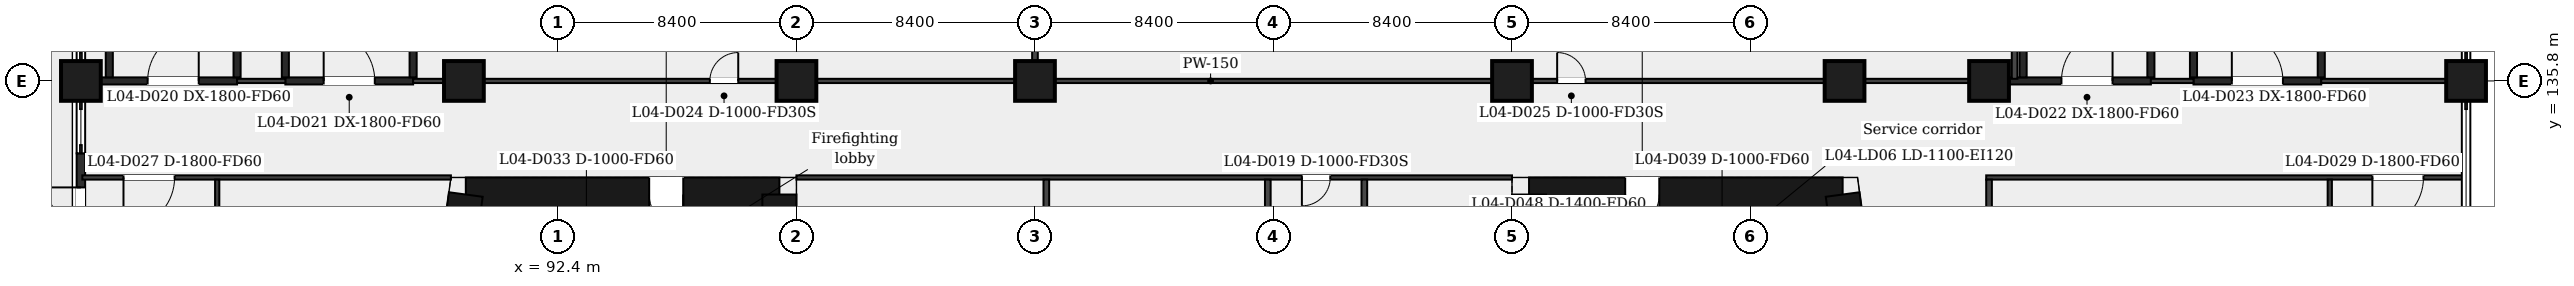
"""IFC4 building model, lengths in metres.
Left out: names, types, materials, properties, quantities, classifications, styles, units other than length and angle.
Written with IfcOpenShell. Run it as: python <this file> out.ifc"""

import sys

from ifc_helpers import new_model, si_unit, direction, frame, frame_2d, origin, origin_2d, place, context, subcontext, project, spatial, rectangle, extrude, element, fill, save


model = new_model("IFC4")
c1 = context("Model", 3, precision=1e-05, world=origin(), true_north=direction((0.0, 1.0)))
c2 = subcontext(c1, "Body", "Model", "MODEL_VIEW")
j1 = project(units=[si_unit("LENGTHUNIT", "METRE"), si_unit("PLANEANGLEUNIT", "RADIAN")], contexts=[c1])
p1 = place(None, origin())
s1 = spatial("IfcSite", under=j1, at=p1, CompositionType="ELEMENT")
p2 = place(p1, origin())
s2 = spatial("IfcBuilding", under=s1, at=p2, CompositionType="ELEMENT")
p3 = place(p2, frame((0.0, 0.0, 29.0)))
s3 = spatial("IfcBuildingStorey", under=s2, at=p3, CompositionType="ELEMENT", Elevation=29.0)
p4 = place(p3, frame((89.156, 131.8, 0.0), z_axis=(0.0, 0.0, 1.0), x_axis=(1.0, 0.0, 0.0)))
e1 = element("IfcWall", 1, at=p4, inside=s3, PredefinedType="SHEAR", context=c2, shape_type="SweptSolid", body=[
    extrude(rectangle(XDim=11.044, YDim=1.2, at=frame_2d((5.522, 0.0))), origin(), (0.0, 0.0, 1.0), 5.0),
])
p5 = place(p4, frame((6.458, 0.0, 0.0)))
e2 = element("IfcOpeningElement", 2, at=p5, cuts=e1, PredefinedType="OPENING", context=c2, shape_type="SweptSolid", body=[
    extrude(rectangle(XDim=1.2, YDim=2.1, at=frame_2d((0.6, 1.05))), frame((0.0, 0.61, 0.0), z_axis=(0.0, -1.0, 0.0), x_axis=(1.0, 0.0, 0.0)), (0.0, 0.0, 1.0), 1.22),
])
p6 = place(p3, frame((100.2, 131.8, 0.0), z_axis=(0.0, 0.0, 1.0), x_axis=(0.0, -1.0, 0.0)))
e3 = element("IfcWall", 3, at=p6, inside=s3, PredefinedType="SHEAR", context=c2, shape_type="SweptSolid", body=[
    extrude(rectangle(XDim=20.8, YDim=1.2, at=frame_2d((10.4, 0.0))), origin(), (0.0, 0.0, 1.0), 5.0),
])
p7 = place(p6, frame((7.65, 0.0, 0.0)))
e4 = element("IfcOpeningElement", 4, at=p7, cuts=e3, PredefinedType="OPENING", context=c2, shape_type="SweptSolid", body=[
    extrude(rectangle(XDim=1.4, YDim=2.1, at=frame_2d((0.7, 1.05))), frame((0.0, 0.61, 0.0), z_axis=(0.0, -1.0, 0.0), x_axis=(1.0, 0.0, 0.0)), (0.0, 0.0, 1.0), 1.22),
])
p8 = place(p3, frame((86.355, 111.0, 0.0), z_axis=(0.0, 0.0, 1.0), x_axis=(0.133413989637, 0.99106039542, 0.0)))
e5 = element("IfcWall", 5, at=p8, inside=s3, PredefinedType="SHEAR", context=c2, shape_type="SweptSolid", body=[
    extrude(rectangle(XDim=20.988, YDim=1.2, at=frame_2d((10.494, 0.0))), origin(), (0.0, 0.0, 1.0), 5.0),
])
p9 = place(p3, frame((126.6, 131.8, 0.0), z_axis=(0.0, 0.0, 1.0), x_axis=(1.0, 0.0, 0.0)))
e6 = element("IfcWall", 6, at=p9, inside=s3, PredefinedType="SHEAR", context=c2, shape_type="SweptSolid", body=[
    extrude(rectangle(XDim=11.044, YDim=1.2, at=frame_2d((5.522, 0.0))), origin(), (0.0, 0.0, 1.0), 5.0),
])
p10 = place(p9, frame((3.386, 0.0, 0.0)))
e7 = element("IfcOpeningElement", 7, at=p10, cuts=e6, PredefinedType="OPENING", context=c2, shape_type="SweptSolid", body=[
    extrude(rectangle(XDim=1.2, YDim=2.1, at=frame_2d((0.6, 1.05))), frame((0.0, 0.61, 0.0), z_axis=(0.0, -1.0, 0.0), x_axis=(1.0, 0.0, 0.0)), (0.0, 0.0, 1.0), 1.22),
])
p11 = place(p3, frame((137.645, 131.8, 0.0), z_axis=(0.0, 0.0, 1.0), x_axis=(0.133413989637, -0.99106039542, 0.0)))
e8 = element("IfcWall", 8, at=p11, inside=s3, PredefinedType="SHEAR", context=c2, shape_type="SweptSolid", body=[
    extrude(rectangle(XDim=20.988, YDim=1.2, at=frame_2d((10.494, 0.0))), origin(), (0.0, 0.0, 1.0), 5.0),
])
p12 = place(p3, frame((126.6, 111.0, 0.0), z_axis=(0.0, 0.0, 1.0), x_axis=(0.0, 1.0, 0.0)))
e9 = element("IfcWall", 9, at=p12, inside=s3, PredefinedType="SHEAR", context=c2, shape_type="SweptSolid", body=[
    extrude(rectangle(XDim=20.8, YDim=1.2, at=frame_2d((10.4, 0.0))), origin(), (0.0, 0.0, 1.0), 5.0),
])
p13 = place(p12, frame((11.75, 0.0, 0.0)))
e10 = element("IfcOpeningElement", 10, at=p13, cuts=e9, PredefinedType="OPENING", context=c2, shape_type="SweptSolid", body=[
    extrude(rectangle(XDim=1.4, YDim=2.1, at=frame_2d((0.7, 1.05))), frame((0.0, 0.61, 0.0), z_axis=(0.0, -1.0, 0.0), x_axis=(1.0, 0.0, 0.0)), (0.0, 0.0, 1.0), 1.22),
])
for number, where, z_axis, x_axis in (
    (11, (75.6, 135.8, 0.0), (0.0, 0.0, 1.0), (1.0, 0.0, 0.0)),
    (12, (89.088, 135.8, 0.0), (0.0, 0.0, 1.0), (1.0, 0.0, 0.0)),
    (13, (100.8, 135.8, 0.0), (0.0, 0.0, 1.0), (1.0, 0.0, 0.0)),
    (14, (109.2, 135.8, 0.0), (0.0, 0.0, 1.0), (1.0, 0.0, 0.0)),
    (15, (126.0, 135.8, 0.0), (0.0, 0.0, 1.0), (1.0, 0.0, 0.0)),
    (16, (137.711, 135.8, 0.0), (0.0, 0.0, 1.0), (1.0, 0.0, 0.0)),
    (17, (142.8, 135.8, 0.0), (0.0, 0.0, 1.0), (1.0, 0.0, 0.0)),
    (18, (159.6, 135.8, 0.0), (0.0, 0.0, 1.0), (1.0, 0.0, 0.0)),
):
    element("IfcColumn", number, at=place(p3, frame(where, z_axis=z_axis, x_axis=x_axis)), inside=s3, PredefinedType="COLUMN", context=c2, shape_type="SweptSolid", body=[
        extrude(rectangle(XDim=1.4, YDim=1.4, at=origin_2d()), origin(), (0.0, 0.0, 1.0), 5.0),
    ])
p14 = place(p3, frame((75.6, 128.45, 0.0), z_axis=(0.0, 0.0, 1.0), x_axis=(0.0, 1.0, 0.0)))
e19 = element("IfcWall", 19, at=p14, inside=s3, PredefinedType="SOLIDWALL", context=c2, shape_type="SweptSolid", body=[
    extrude(rectangle(XDim=4.8, YDim=0.3, at=frame_2d((2.4, 0.0))), origin(), (0.0, 0.0, 1.0), 4.4),
])
p15 = place(p14, frame((1.2, 0.0, 0.0)))
e20 = element("IfcOpeningElement", 20, at=p15, cuts=e19, PredefinedType="OPENING", context=c2, shape_type="SweptSolid", body=[
    extrude(rectangle(XDim=2.4, YDim=2.4, at=frame_2d((1.2, 1.2))), frame((0.0, 0.16, 0.0), z_axis=(0.0, -1.0, 0.0), x_axis=(1.0, 0.0, 0.0)), (0.0, 0.0, 1.0), 0.32),
])
p16 = place(p3, frame((75.65, 132.4, 0.0), z_axis=(0.0, 0.0, 1.0), x_axis=(1.0, 0.0, 0.0)))
e21 = element("IfcWall", 21, at=p16, inside=s3, PredefinedType="PARTITIONING", context=c2, shape_type="SweptSolid", body=[
    extrude(rectangle(XDim=12.981, YDim=0.15, at=frame_2d((6.491, 0.0))), origin(), (0.0, 0.0, 1.0), 4.4),
])
p17 = place(p16, frame((1.45, 0.0, 0.0)))
e22 = element("IfcOpeningElement", 22, at=p17, cuts=e21, PredefinedType="OPENING", context=c2, shape_type="SweptSolid", body=[
    extrude(rectangle(XDim=1.8, YDim=2.1, at=frame_2d((0.9, 1.05))), frame((0.0, 0.085, 0.0), z_axis=(0.0, -1.0, 0.0), x_axis=(1.0, 0.0, 0.0)), (0.0, 0.0, 1.0), 0.17),
])
p18 = place(p3, frame((100.8, 132.4, 0.0), z_axis=(0.0, 0.0, 1.0), x_axis=(1.0, 0.0, 0.0)))
e23 = element("IfcWall", 23, at=p18, inside=s3, PredefinedType="PARTITIONING", context=c2, shape_type="SweptSolid", body=[
    extrude(rectangle(XDim=25.2, YDim=0.15, at=frame_2d((12.6, 0.0))), origin(), (0.0, 0.0, 1.0), 4.4),
])
p19 = place(p18, frame((17.8, 0.0, 0.0)))
e24 = element("IfcOpeningElement", 24, at=p19, cuts=e23, PredefinedType="OPENING", context=c2, shape_type="SweptSolid", body=[
    extrude(rectangle(XDim=1.0, YDim=2.1, at=frame_2d((0.5, 1.05))), frame((0.0, 0.085, 0.0), z_axis=(0.0, -1.0, 0.0), x_axis=(1.0, 0.0, 0.0)), (0.0, 0.0, 1.0), 0.17),
])
p20 = place(p3, frame((142.7, 132.4, 0.0), z_axis=(0.0, 0.0, 1.0), x_axis=(1.0, 0.0, 0.0)))
e25 = element("IfcWall", 25, at=p20, inside=s3, PredefinedType="PARTITIONING", context=c2, shape_type="SweptSolid", body=[
    extrude(rectangle(XDim=16.85, YDim=0.15, at=frame_2d((8.425, 0.0))), origin(), (0.0, 0.0, 1.0), 4.4),
])
p21 = place(p20, frame((13.6, 0.0, 0.0)))
e26 = element("IfcOpeningElement", 26, at=p21, cuts=e25, PredefinedType="OPENING", context=c2, shape_type="SweptSolid", body=[
    extrude(rectangle(XDim=1.8, YDim=2.1, at=frame_2d((0.9, 1.05))), frame((0.0, 0.085, 0.0), z_axis=(0.0, -1.0, 0.0), x_axis=(1.0, 0.0, 0.0)), (0.0, 0.0, 1.0), 0.17),
])
p22 = place(p3, frame((76.27, 135.8, 0.0), z_axis=(0.0, 0.0, 1.0), x_axis=(1.0, 0.0, 0.0)))
e27 = element("IfcWall", 27, at=p22, inside=s3, PredefinedType="PARTITIONING", context=c2, shape_type="SweptSolid", body=[
    extrude(rectangle(XDim=4.83, YDim=0.25, at=frame_2d((2.415, 0.0))), origin(), (0.0, 0.0, 1.0), 4.4),
])
p23 = place(p22, frame((1.68, 0.0, 0.0)))
e28 = element("IfcOpeningElement", 28, at=p23, cuts=e27, PredefinedType="OPENING", context=c2, shape_type="SweptSolid", body=[
    extrude(rectangle(XDim=1.8, YDim=2.1, at=frame_2d((0.9, 1.05))), frame((0.0, 0.135, 0.0), z_axis=(0.0, -1.0, 0.0), x_axis=(1.0, 0.0, 0.0)), (0.0, 0.0, 1.0), 0.27),
])
p24 = place(p3, frame((82.8, 135.8, 0.0), z_axis=(0.0, 0.0, 1.0), x_axis=(1.0, 0.0, 0.0)))
e29 = element("IfcWall", 29, at=p24, inside=s3, PredefinedType="PARTITIONING", context=c2, shape_type="SweptSolid", body=[
    extrude(rectangle(XDim=4.5, YDim=0.25, at=frame_2d((2.25, 0.0))), origin(), (0.0, 0.0, 1.0), 4.4),
])
p25 = place(p24, frame((1.35, 0.0, 0.0)))
e30 = element("IfcOpeningElement", 30, at=p25, cuts=e29, PredefinedType="OPENING", context=c2, shape_type="SweptSolid", body=[
    extrude(rectangle(XDim=1.8, YDim=2.1, at=frame_2d((0.9, 1.05))), frame((0.0, 0.135, 0.0), z_axis=(0.0, -1.0, 0.0), x_axis=(1.0, 0.0, 0.0)), (0.0, 0.0, 1.0), 0.27),
])
p26 = place(p3, frame((143.47, 135.8, 0.0), z_axis=(0.0, 0.0, 1.0), x_axis=(1.0, 0.0, 0.0)))
e31 = element("IfcWall", 31, at=p26, inside=s3, PredefinedType="PARTITIONING", context=c2, shape_type="SweptSolid", body=[
    extrude(rectangle(XDim=5.03, YDim=0.25, at=frame_2d((2.515, 0.0))), origin(), (0.0, 0.0, 1.0), 4.4),
])
p27 = place(p26, frame((1.88, 0.0, 0.0)))
e32 = element("IfcOpeningElement", 32, at=p27, cuts=e31, PredefinedType="OPENING", context=c2, shape_type="SweptSolid", body=[
    extrude(rectangle(XDim=1.8, YDim=2.1, at=frame_2d((0.9, 1.05))), frame((0.0, 0.135, 0.0), z_axis=(0.0, -1.0, 0.0), x_axis=(1.0, 0.0, 0.0)), (0.0, 0.0, 1.0), 0.27),
])
p28 = place(p3, frame((150.0, 135.8, 0.0), z_axis=(0.0, 0.0, 1.0), x_axis=(1.0, 0.0, 0.0)))
e33 = element("IfcWall", 33, at=p28, inside=s3, PredefinedType="PARTITIONING", context=c2, shape_type="SweptSolid", body=[
    extrude(rectangle(XDim=4.5, YDim=0.25, at=frame_2d((2.25, 0.0))), origin(), (0.0, 0.0, 1.0), 4.4),
])
p29 = place(p28, frame((1.35, 0.0, 0.0)))
e34 = element("IfcOpeningElement", 34, at=p29, cuts=e33, PredefinedType="OPENING", context=c2, shape_type="SweptSolid", body=[
    extrude(rectangle(XDim=1.8, YDim=2.1, at=frame_2d((0.9, 1.05))), frame((0.0, 0.135, 0.0), z_axis=(0.0, -1.0, 0.0), x_axis=(1.0, 0.0, 0.0)), (0.0, 0.0, 1.0), 0.27),
])
p30 = place(p3, frame((75.65, 135.8, 0.0), z_axis=(0.0, 0.0, 1.0), x_axis=(1.0, 0.0, 0.0)))
e35 = element("IfcWall", 35, at=p30, inside=s3, PredefinedType="PARTITIONING", context=c2, shape_type="SweptSolid", body=[
    extrude(rectangle(XDim=0.62, YDim=0.15, at=frame_2d((0.31, 0.0))), origin(), (0.0, 0.0, 1.0), 4.4),
])
p31 = place(p3, frame((81.1, 135.8, 0.0), z_axis=(0.0, 0.0, 1.0), x_axis=(1.0, 0.0, 0.0)))
e36 = element("IfcWall", 36, at=p31, inside=s3, PredefinedType="PARTITIONING", context=c2, shape_type="SweptSolid", body=[
    extrude(rectangle(XDim=1.7, YDim=0.15, at=frame_2d((0.85, 0.0))), origin(), (0.0, 0.0, 1.0), 4.4),
])
p32 = place(p3, frame((87.3, 135.8, 0.0), z_axis=(0.0, 0.0, 1.0), x_axis=(1.0, 0.0, 0.0)))
e37 = element("IfcWall", 37, at=p32, inside=s3, PredefinedType="PARTITIONING", context=c2, shape_type="SweptSolid", body=[
    extrude(rectangle(XDim=56.17, YDim=0.15, at=frame_2d((28.085, 0.0))), origin(), (0.0, 0.0, 1.0), 4.4),
])
p33 = place(p32, frame((10.45, 0.0, 0.0)))
e38 = element("IfcOpeningElement", 38, at=p33, cuts=e37, PredefinedType="OPENING", context=c2, shape_type="SweptSolid", body=[
    extrude(rectangle(XDim=1.0, YDim=2.1, at=frame_2d((0.5, 1.05))), frame((0.0, 0.085, 0.0), z_axis=(0.0, -1.0, 0.0), x_axis=(1.0, 0.0, 0.0)), (0.0, 0.0, 1.0), 0.17),
])
p34 = place(p32, frame((40.29, 0.0, 0.0)))
e39 = element("IfcOpeningElement", 39, at=p34, cuts=e37, PredefinedType="OPENING", context=c2, shape_type="SweptSolid", body=[
    extrude(rectangle(XDim=1.0, YDim=2.1, at=frame_2d((0.5, 1.05))), frame((0.0, 0.085, 0.0), z_axis=(0.0, -1.0, 0.0), x_axis=(1.0, 0.0, 0.0)), (0.0, 0.0, 1.0), 0.17),
])
p35 = place(p3, frame((148.5, 135.8, 0.0), z_axis=(0.0, 0.0, 1.0), x_axis=(1.0, 0.0, 0.0)))
e40 = element("IfcWall", 40, at=p35, inside=s3, PredefinedType="PARTITIONING", context=c2, shape_type="SweptSolid", body=[
    extrude(rectangle(XDim=1.5, YDim=0.15, at=frame_2d((0.75, 0.0))), origin(), (0.0, 0.0, 1.0), 4.4),
])
p36 = place(p3, frame((154.5, 135.8, 0.0), z_axis=(0.0, 0.0, 1.0), x_axis=(1.0, 0.0, 0.0)))
e41 = element("IfcWall", 41, at=p36, inside=s3, PredefinedType="PARTITIONING", context=c2, shape_type="SweptSolid", body=[
    extrude(rectangle(XDim=5.05, YDim=0.15, at=frame_2d((2.525, 0.0))), origin(), (0.0, 0.0, 1.0), 4.4),
])
p37 = place(p3, frame((76.6, 135.925, 0.0), z_axis=(0.0, 0.0, 1.0), x_axis=(0.0, 1.0, 0.0)))
e42 = element("IfcWall", 42, at=p37, inside=s3, PredefinedType="PARTITIONING", context=c2, shape_type="SweptSolid", body=[
    extrude(rectangle(XDim=8.825, YDim=0.25, at=frame_2d((4.413, 0.0))), origin(), (0.0, 0.0, 1.0), 4.4),
])
p38 = place(p3, frame((80.4, 110.475, 0.0), z_axis=(0.0, 0.0, 1.0), x_axis=(0.0, 1.0, 0.0)))
e43 = element("IfcWall", 43, at=p38, inside=s3, PredefinedType="PARTITIONING", context=c2, shape_type="SweptSolid", body=[
    extrude(rectangle(XDim=21.85, YDim=0.15, at=frame_2d((10.925, 0.0))), origin(), (0.0, 0.0, 1.0), 4.4),
])
for number, where, z_axis, x_axis in (
    (44, (81.1, 135.925, 0.0), (0.0, 0.0, 1.0), (0.0, 1.0, 0.0)),
    (45, (82.8, 135.925, 0.0), (0.0, 0.0, 1.0), (0.0, 1.0, 0.0)),
    (46, (87.3, 135.925, 0.0), (0.0, 0.0, 1.0), (0.0, 1.0, 0.0)),
):
    element("IfcWall", number, at=place(p3, frame(where, z_axis=z_axis, x_axis=x_axis)), inside=s3, PredefinedType="PARTITIONING", context=c2, shape_type="SweptSolid", body=[
        extrude(rectangle(XDim=8.825, YDim=0.25, at=frame_2d((4.413, 0.0))), origin(), (0.0, 0.0, 1.0), 4.4),
    ])
p39 = place(p3, frame((109.2, 135.875, 0.0), z_axis=(0.0, 0.0, 1.0), x_axis=(0.0, 1.0, 0.0)))
e47 = element("IfcWall", 47, at=p39, inside=s3, PredefinedType="PARTITIONING", context=c2, shape_type="SweptSolid", body=[
    extrude(rectangle(XDim=8.875, YDim=0.2, at=frame_2d((4.438, 0.0))), origin(), (0.0, 0.0, 1.0), 4.4),
])
for number, where, z_axis, x_axis in (
    (48, (109.6, 122.975, 0.0), (0.0, 0.0, 1.0), (0.0, 1.0, 0.0)),
    (49, (117.4, 122.975, 0.0), (0.0, 0.0, 1.0), (0.0, 1.0, 0.0)),
    (50, (120.8, 122.975, 0.0), (0.0, 0.0, 1.0), (0.0, 1.0, 0.0)),
):
    element("IfcWall", number, at=place(p3, frame(where, z_axis=z_axis, x_axis=x_axis)), inside=s3, PredefinedType="PARTITIONING", context=c2, shape_type="SweptSolid", body=[
        extrude(rectangle(XDim=9.35, YDim=0.2, at=frame_2d((4.675, 0.0))), origin(), (0.0, 0.0, 1.0), 4.4),
    ])
p40 = place(p3, frame((142.8, 110.475, 0.0), z_axis=(0.0, 0.0, 1.0), x_axis=(0.0, 1.0, 0.0)))
e51 = element("IfcWall", 51, at=p40, inside=s3, PredefinedType="PARTITIONING", context=c2, shape_type="SweptSolid", body=[
    extrude(rectangle(XDim=21.85, YDim=0.2, at=frame_2d((10.925, 0.0))), origin(), (0.0, 0.0, 1.0), 4.4),
])
p41 = place(p3, frame((143.7, 135.875, 0.0), z_axis=(0.0, 0.0, 1.0), x_axis=(0.0, 1.0, 0.0)))
e52 = element("IfcWall", 52, at=p41, inside=s3, PredefinedType="PARTITIONING", context=c2, shape_type="SweptSolid", body=[
    extrude(rectangle(XDim=8.875, YDim=0.2, at=frame_2d((4.438, 0.0))), origin(), (0.0, 0.0, 1.0), 4.4),
])
for number, where, z_axis, x_axis in (
    (53, (144.0, 135.925, 0.0), (0.0, 0.0, 1.0), (0.0, 1.0, 0.0)),
    (54, (148.5, 135.925, 0.0), (0.0, 0.0, 1.0), (0.0, 1.0, 0.0)),
    (55, (150.0, 135.925, 0.0), (0.0, 0.0, 1.0), (0.0, 1.0, 0.0)),
    (56, (154.5, 135.925, 0.0), (0.0, 0.0, 1.0), (0.0, 1.0, 0.0)),
):
    element("IfcWall", number, at=place(p3, frame(where, z_axis=z_axis, x_axis=x_axis)), inside=s3, PredefinedType="PARTITIONING", context=c2, shape_type="SweptSolid", body=[
        extrude(rectangle(XDim=8.825, YDim=0.25, at=frame_2d((4.413, 0.0))), origin(), (0.0, 0.0, 1.0), 4.4),
    ])
p42 = place(p3, frame((154.8, 110.475, 0.0), z_axis=(0.0, 0.0, 1.0), x_axis=(0.0, 1.0, 0.0)))
e57 = element("IfcWall", 57, at=p42, inside=s3, PredefinedType="PARTITIONING", context=c2, shape_type="SweptSolid", body=[
    extrude(rectangle(XDim=21.85, YDim=0.15, at=frame_2d((10.925, 0.0))), origin(), (0.0, 0.0, 1.0), 4.4),
])
p43 = place(p15, origin())
e58 = element("IfcDoor", 58, at=p43, inside=s3, OperationType="DOUBLE_DOOR_DOUBLE_SWING", PredefinedType="DOOR", context=c2, shape_type="SweptSolid", body=[
    extrude(rectangle(XDim=2.4, YDim=2.4, at=frame_2d((1.2, 1.2))), frame((0.0, 0.025, 0.0), z_axis=(0.0, -1.0, 0.0), x_axis=(1.0, 0.0, 0.0)), (0.0, 0.0, 1.0), 0.05),
])
fill(e20, e58)
p44 = place(p19, origin())
e59 = element("IfcDoor", 59, at=p44, inside=s3, OperationType="SINGLE_SWING_LEFT", PredefinedType="DOOR", context=c2, shape_type="SweptSolid", body=[
    extrude(rectangle(XDim=1.0, YDim=2.1, at=frame_2d((0.5, 1.05))), frame((0.0, 0.025, 0.0), z_axis=(0.0, -1.0, 0.0), x_axis=(1.0, 0.0, 0.0)), (0.0, 0.0, 1.0), 0.05),
])
fill(e24, e59)
p45 = place(p23, origin())
e60 = element("IfcDoor", 60, at=p45, inside=s3, OperationType="SINGLE_SWING_RIGHT", PredefinedType="DOOR", context=c2, shape_type="SweptSolid", body=[
    extrude(rectangle(XDim=1.8, YDim=2.1, at=frame_2d((0.9, 1.05))), frame((0.0, 0.025, 0.0), z_axis=(0.0, -1.0, 0.0), x_axis=(1.0, 0.0, 0.0)), (0.0, 0.0, 1.0), 0.05),
])
fill(e28, e60)
p46 = place(p25, origin())
e61 = element("IfcDoor", 61, at=p46, inside=s3, OperationType="SINGLE_SWING_LEFT", PredefinedType="DOOR", context=c2, shape_type="SweptSolid", body=[
    extrude(rectangle(XDim=1.8, YDim=2.1, at=frame_2d((0.9, 1.05))), frame((0.0, 0.025, 0.0), z_axis=(0.0, -1.0, 0.0), x_axis=(1.0, 0.0, 0.0)), (0.0, 0.0, 1.0), 0.05),
])
fill(e30, e61)
p47 = place(p27, origin())
e62 = element("IfcDoor", 62, at=p47, inside=s3, OperationType="SINGLE_SWING_RIGHT", PredefinedType="DOOR", context=c2, shape_type="SweptSolid", body=[
    extrude(rectangle(XDim=1.8, YDim=2.1, at=frame_2d((0.9, 1.05))), frame((0.0, 0.025, 0.0), z_axis=(0.0, -1.0, 0.0), x_axis=(1.0, 0.0, 0.0)), (0.0, 0.0, 1.0), 0.05),
])
fill(e32, e62)
p48 = place(p29, origin())
e63 = element("IfcDoor", 63, at=p48, inside=s3, OperationType="SINGLE_SWING_LEFT", PredefinedType="DOOR", context=c2, shape_type="SweptSolid", body=[
    extrude(rectangle(XDim=1.8, YDim=2.1, at=frame_2d((0.9, 1.05))), frame((0.0, 0.025, 0.0), z_axis=(0.0, -1.0, 0.0), x_axis=(1.0, 0.0, 0.0)), (0.0, 0.0, 1.0), 0.05),
])
fill(e34, e63)
p49 = place(p33, origin())
e64 = element("IfcDoor", 64, at=p49, inside=s3, OperationType="SINGLE_SWING_RIGHT", PredefinedType="DOOR", context=c2, shape_type="SweptSolid", body=[
    extrude(rectangle(XDim=1.0, YDim=2.1, at=frame_2d((0.5, 1.05))), frame((0.0, 0.025, 0.0), z_axis=(0.0, -1.0, 0.0), x_axis=(1.0, 0.0, 0.0)), (0.0, 0.0, 1.0), 0.05),
])
fill(e38, e64)
p50 = place(p34, origin())
e65 = element("IfcDoor", 65, at=p50, inside=s3, OperationType="SINGLE_SWING_LEFT", PredefinedType="DOOR", context=c2, shape_type="SweptSolid", body=[
    extrude(rectangle(XDim=1.0, YDim=2.1, at=frame_2d((0.5, 1.05))), frame((0.0, 0.025, 0.0), z_axis=(0.0, -1.0, 0.0), x_axis=(1.0, 0.0, 0.0)), (0.0, 0.0, 1.0), 0.05),
])
fill(e39, e65)
p51 = place(p17, origin())
e66 = element("IfcDoor", 66, at=p51, inside=s3, OperationType="SINGLE_SWING_LEFT", PredefinedType="DOOR", context=c2, shape_type="SweptSolid", body=[
    extrude(rectangle(XDim=1.8, YDim=2.1, at=frame_2d((0.9, 1.05))), frame((0.0, 0.025, 0.0), z_axis=(0.0, -1.0, 0.0), x_axis=(1.0, 0.0, 0.0)), (0.0, 0.0, 1.0), 0.05),
])
fill(e22, e66)
p52 = place(p21, origin())
e67 = element("IfcDoor", 67, at=p52, inside=s3, OperationType="SINGLE_SWING_LEFT", PredefinedType="DOOR", context=c2, shape_type="SweptSolid", body=[
    extrude(rectangle(XDim=1.8, YDim=2.1, at=frame_2d((0.9, 1.05))), frame((0.0, 0.025, 0.0), z_axis=(0.0, -1.0, 0.0), x_axis=(1.0, 0.0, 0.0)), (0.0, 0.0, 1.0), 0.05),
])
fill(e26, e67)
p53 = place(p5, origin())
e68 = element("IfcDoor", 68, at=p53, inside=s3, OperationType="SINGLE_SWING_RIGHT", PredefinedType="DOOR", context=c2, shape_type="SweptSolid", body=[
    extrude(rectangle(XDim=1.2, YDim=2.1, at=frame_2d((0.6, 1.05))), frame((0.0, 0.025, 0.0), z_axis=(0.0, -1.0, 0.0), x_axis=(1.0, 0.0, 0.0)), (0.0, 0.0, 1.0), 0.05),
])
fill(e2, e68)
p54 = place(p10, origin())
e69 = element("IfcDoor", 69, at=p54, inside=s3, OperationType="SINGLE_SWING_LEFT", PredefinedType="DOOR", context=c2, shape_type="SweptSolid", body=[
    extrude(rectangle(XDim=1.2, YDim=2.1, at=frame_2d((0.6, 1.05))), frame((0.0, 0.025, 0.0), z_axis=(0.0, -1.0, 0.0), x_axis=(1.0, 0.0, 0.0)), (0.0, 0.0, 1.0), 0.05),
])
fill(e7, e69)
save(model, sys.argv[1])
